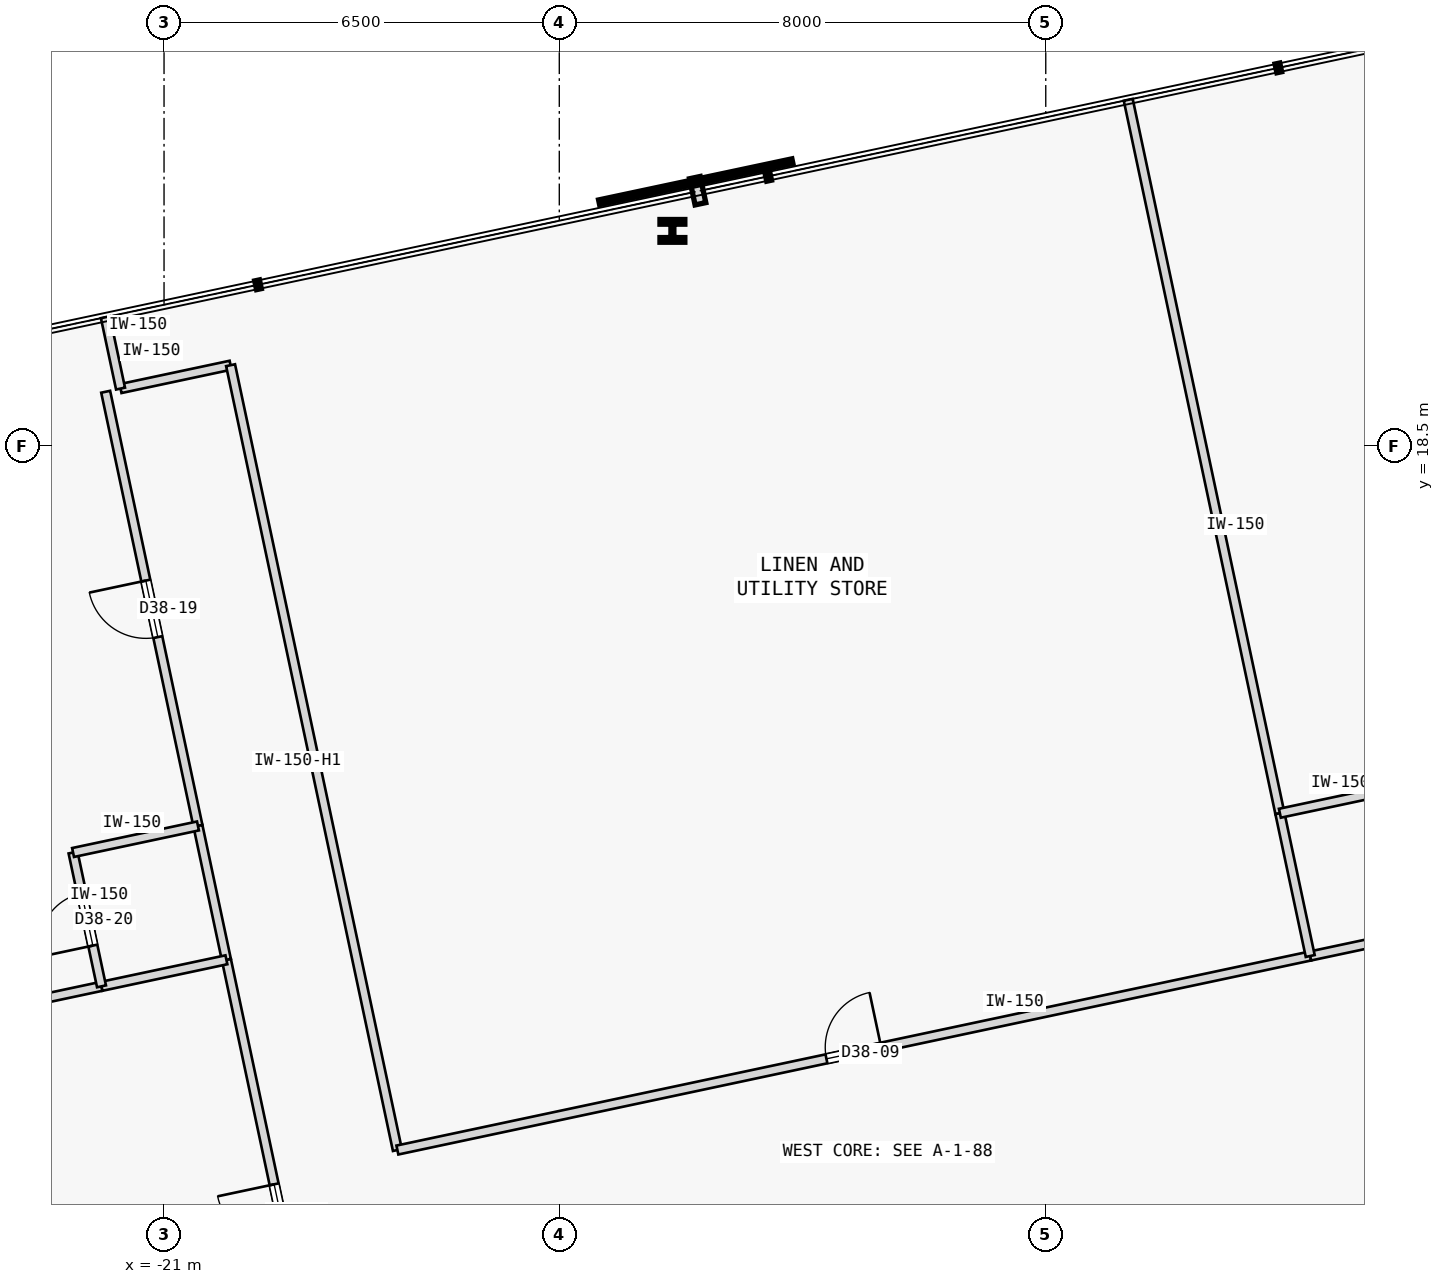
"""IFC4 building model, lengths in metres.
Left out: names, types, materials, properties, quantities, classifications, styles, units other than length and angle.
Written with IfcOpenShell. Run it as: python <this file> out.ifc"""

import sys

from ifc_helpers import new_model, si_unit, direction, frame, frame_2d, origin, origin_2d, place, context, subcontext, project, spatial, rectangle, i_section, extrude, element, fill, save


model = new_model("IFC4")
c1 = context("Model", 3, precision=1e-05, world=origin(), true_north=direction((0.0, 1.0)))
c2 = subcontext(c1, "Body", "Model", "MODEL_VIEW")
j1 = project(units=[si_unit("LENGTHUNIT", "METRE"), si_unit("PLANEANGLEUNIT", "RADIAN")], contexts=[c1])
p1 = place(None, origin())
s1 = spatial("IfcSite", under=j1, at=p1, CompositionType="ELEMENT")
p2 = place(p1, origin())
s2 = spatial("IfcBuilding", under=s1, at=p2, CompositionType="ELEMENT")
p3 = place(p2, frame((0.0, 0.0, 151.4)))
s3 = spatial("IfcBuildingStorey", under=s2, at=p3, CompositionType="ELEMENT", Elevation=151.4)
p4 = place(p3, frame((-12.64, 22.042, 0.0), z_axis=(0.0, 0.0, 1.0), x_axis=(1.0, 0.0, 0.0)))
e1 = element("IfcColumn", 1, at=p4, inside=s3, PredefinedType="COLUMN", context=c2, shape_type="SweptSolid", body=[
    extrude(i_section(OverallWidth=0.409, OverallDepth=0.374, WebThickness=0.048, FlangeThickness=0.077, FilletRadius=0.015, at=origin_2d()), origin(), (0.0, 0.0, 1.0), 3.4),
])
p5 = place(p3, frame((-21.715, 19.448, 0.0), z_axis=(0.0, 0.0, 1.0), x_axis=(0.978160192495, 0.207852442415, 0.0)))
e2 = element("IfcWall", 2, at=p5, inside=s3, PredefinedType="PARTITIONING", context=c2, shape_type="SweptSolid", body=[
    extrude(rectangle(XDim=1.85, YDim=0.15, at=frame_2d((0.925, 0.0))), origin(), (0.0, 0.0, 1.0), 3.175),
])
p6 = place(p3, frame((-17.162, 6.926, 0.0), z_axis=(0.0, 0.0, 1.0), x_axis=(-0.207911421929, 0.978147657888, 0.0)))
e3 = element("IfcWall", 3, at=p6, inside=s3, PredefinedType="PARTITIONING", context=c2, shape_type="SweptSolid", body=[
    extrude(rectangle(XDim=13.195, YDim=0.15, at=frame_2d((6.598, 0.0))), origin(), (0.0, 0.0, 1.0), 2.725),
])
p7 = place(p3, frame((-17.162, 6.926, 0.0), z_axis=(0.0, 0.0, 1.0), x_axis=(0.978145870853, 0.207919829103, 0.0)))
e4 = element("IfcWall", 4, at=p7, inside=s3, PredefinedType="PARTITIONING", context=c2, shape_type="SweptSolid", body=[
    extrude(rectangle(XDim=15.347, YDim=0.15, at=frame_2d((7.673, 0.0))), origin(), (0.0, 0.0, 1.0), 3.175),
])
p8 = place(p7, frame((7.213, 0.0, 0.0)))
e5 = element("IfcOpeningElement", 5, at=p8, cuts=e4, PredefinedType="OPENING", context=c2, shape_type="SweptSolid", body=[
    extrude(rectangle(XDim=0.92, YDim=2.15, at=frame_2d((0.46, 1.075))), frame((0.0, 0.085, 0.0), z_axis=(0.0, -1.0, 0.0), x_axis=(1.0, 0.0, 0.0)), (0.0, 0.0, 1.0), 0.17),
])
p9 = place(p3, frame((-2.151, 10.117, 0.0), z_axis=(0.0, 0.0, 1.0), x_axis=(0.978146728319, 0.207915795165, 0.0)))
e6 = element("IfcWall", 6, at=p9, inside=s3, PredefinedType="PARTITIONING", context=c2, shape_type="SweptSolid", body=[
    extrude(rectangle(XDim=2.15, YDim=0.15, at=frame_2d((1.075, 0.0))), origin(), (0.0, 0.0, 1.0), 3.175),
])
p10 = place(p3, frame((-18.207, 1.74, 0.0), z_axis=(0.0, 0.0, 1.0), x_axis=(-0.207922306475, 0.978145344246, 0.0)))
e7 = element("IfcWall", 7, at=p10, inside=s3, PredefinedType="PARTITIONING", context=c2, shape_type="SweptSolid", body=[
    extrude(rectangle(XDim=8.5, YDim=0.15, at=frame_2d((4.25, 0.0))), origin(), (0.0, 0.0, 1.0), 3.175),
])
p11 = place(p10, frame((3.775, 0.0, 0.0)))
e8 = element("IfcOpeningElement", 8, at=p11, cuts=e7, PredefinedType="OPENING", context=c2, shape_type="SweptSolid", body=[
    extrude(rectangle(XDim=0.95, YDim=2.15, at=frame_2d((0.475, 1.075))), frame((0.0, 0.085, 0.0), z_axis=(0.0, -1.0, 0.0), x_axis=(1.0, 0.0, 0.0)), (0.0, 0.0, 1.0), 0.17),
])
p12 = place(p3, frame((-20.442, 12.255, 0.0), z_axis=(0.0, 0.0, 1.0), x_axis=(-0.207916352354, 0.978146609882, 0.0)))
e9 = element("IfcWall", 9, at=p12, inside=s3, PredefinedType="PARTITIONING", context=c2, shape_type="SweptSolid", body=[
    extrude(rectangle(XDim=7.3, YDim=0.15, at=frame_2d((3.65, 0.0))), origin(), (0.0, 0.0, 1.0), 3.175),
])
p13 = place(p12, frame((3.175, 0.0, 0.0)))
e10 = element("IfcOpeningElement", 10, at=p13, cuts=e9, PredefinedType="OPENING", context=c2, shape_type="SweptSolid", body=[
    extrude(rectangle(XDim=0.95, YDim=2.15, at=frame_2d((0.475, 1.075))), frame((0.0, 0.085, 0.0), z_axis=(0.0, -1.0, 0.0), x_axis=(1.0, 0.0, 0.0)), (0.0, 0.0, 1.0), 0.17),
])
p14 = place(p3, frame((-19.974, 10.055, 0.0), z_axis=(0.0, 0.0, 1.0), x_axis=(-0.207913264065, 0.978147266328, 0.0)))
e11 = element("IfcWall", 11, at=p14, inside=s3, PredefinedType="PARTITIONING", context=c2, shape_type="SweptSolid", body=[
    extrude(rectangle(XDim=2.25, YDim=0.15, at=frame_2d((1.125, 0.0))), origin(), (0.0, 0.0, 1.0), 3.175),
])
p15 = place(p3, frame((-2.65, 12.464, 0.0), z_axis=(0.0, 0.0, 1.0), x_axis=(-0.207914988081, 0.978146899873, 0.0)))
e12 = element("IfcWall", 12, at=p15, inside=s3, PredefinedType="PARTITIONING", context=c2, shape_type="SweptSolid", body=[
    extrude(rectangle(XDim=11.995, YDim=0.15, at=frame_2d((5.998, 0.0))), origin(), (0.0, 0.0, 1.0), 3.175),
])
p16 = place(p3, frame((-2.151, 10.117, 0.0), z_axis=(0.0, 0.0, 1.0), x_axis=(-0.207917150959, 0.978146440129, 0.0)))
e13 = element("IfcWall", 13, at=p16, inside=s3, PredefinedType="PARTITIONING", context=c2, shape_type="SweptSolid", body=[
    extrude(rectangle(XDim=2.4, YDim=0.15, at=frame_2d((1.2, 0.0))), origin(), (0.0, 0.0, 1.0), 3.175),
])
p17 = place(p3, frame((-21.715, 19.448, 0.0), z_axis=(0.0, 0.0, 1.0), x_axis=(-0.20795853359, 0.978137642823, 0.0)))
e14 = element("IfcWall", 14, at=p17, inside=s3, PredefinedType="PARTITIONING", context=c2, shape_type="SweptSolid", body=[
    extrude(rectangle(XDim=1.2, YDim=0.15, at=frame_2d((0.6, 0.0))), origin(), (0.0, 0.0, 1.0), 3.175),
])
p18 = place(p3, frame((-2.65, 12.464, 0.0), z_axis=(0.0, 0.0, 1.0), x_axis=(0.978146728319, 0.207915795165, 0.0)))
e15 = element("IfcWall", 15, at=p18, inside=s3, PredefinedType="PARTITIONING", context=c2, shape_type="SweptSolid", body=[
    extrude(rectangle(XDim=2.15, YDim=0.15, at=frame_2d((1.075, 0.0))), origin(), (0.0, 0.0, 1.0), 3.175),
])
p19 = place(p3, frame((-37.403, 6.35, 0.0), z_axis=(0.0, 0.0, 1.0), x_axis=(0.978149296727, 0.207903711638, 0.0)))
e16 = element("IfcWall", 16, at=p19, inside=s3, PredefinedType="PARTITIONING", context=c2, shape_type="SweptSolid", body=[
    extrude(rectangle(XDim=15.718, YDim=0.15, at=frame_2d((7.859, 0.0))), origin(), (0.0, 0.0, 1.0), 3.175),
])
p20 = place(p3, frame((-22.029, 9.618, 0.0), z_axis=(0.0, 0.0, 1.0), x_axis=(0.978134617382, 0.207972763311, 0.0)))
e17 = element("IfcWall", 17, at=p20, inside=s3, PredefinedType="PARTITIONING", context=c2, shape_type="SweptSolid", body=[
    extrude(rectangle(XDim=2.1, YDim=0.15, at=frame_2d((1.05, 0.0))), origin(), (0.0, 0.0, 1.0), 3.175),
])
p21 = place(p3, frame((-22.029, 9.618, 0.0), z_axis=(0.0, 0.0, 1.0), x_axis=(-0.207891197838, 0.978151956427, 0.0)))
e18 = element("IfcWall", 18, at=p21, inside=s3, PredefinedType="PARTITIONING", context=c2, shape_type="SweptSolid", body=[
    extrude(rectangle(XDim=2.25, YDim=0.15, at=frame_2d((1.125, 0.0))), origin(), (0.0, 0.0, 1.0), 3.175),
])
p22 = place(p21, frame((0.685, 0.0, 0.0)))
e19 = element("IfcOpeningElement", 19, at=p22, cuts=e18, PredefinedType="OPENING", context=c2, shape_type="SweptSolid", body=[
    extrude(rectangle(XDim=0.88, YDim=2.15, at=frame_2d((0.44, 1.075))), frame((0.0, 0.085, 0.0), z_axis=(0.0, -1.0, 0.0), x_axis=(1.0, 0.0, 0.0)), (0.0, 0.0, 1.0), 0.17),
])
p23 = place(p3, frame((-22.496, 11.819, 0.0), z_axis=(0.0, 0.0, 1.0), x_axis=(0.97815826, 0.207861536591, 0.0)))
e20 = element("IfcWall", 20, at=p23, inside=s3, PredefinedType="PARTITIONING", context=c2, shape_type="SweptSolid", body=[
    extrude(rectangle(XDim=2.1, YDim=0.15, at=frame_2d((1.05, 0.0))), origin(), (0.0, 0.0, 1.0), 3.175),
])
p24 = place(p8, origin())
e21 = element("IfcDoor", 21, at=p24, inside=s3, OperationType="SINGLE_SWING_RIGHT", PredefinedType="DOOR", context=c2, shape_type="SweptSolid", body=[
    extrude(rectangle(XDim=0.92, YDim=2.15, at=frame_2d((0.46, 1.075))), frame((0.0, 0.025, 0.0), z_axis=(0.0, -1.0, 0.0), x_axis=(1.0, 0.0, 0.0)), (0.0, 0.0, 1.0), 0.05),
])
fill(e5, e21)
p25 = place(p11, origin())
e22 = element("IfcDoor", 22, at=p25, inside=s3, OperationType="SINGLE_SWING_RIGHT", PredefinedType="DOOR", context=c2, shape_type="SweptSolid", body=[
    extrude(rectangle(XDim=0.95, YDim=2.15, at=frame_2d((0.475, 1.075))), frame((0.0, 0.025, 0.0), z_axis=(0.0, -1.0, 0.0), x_axis=(1.0, 0.0, 0.0)), (0.0, 0.0, 1.0), 0.05),
])
fill(e8, e22)
p26 = place(p13, origin())
e23 = element("IfcDoor", 23, at=p26, inside=s3, OperationType="SINGLE_SWING_RIGHT", PredefinedType="DOOR", context=c2, shape_type="SweptSolid", body=[
    extrude(rectangle(XDim=0.95, YDim=2.15, at=frame_2d((0.475, 1.075))), frame((0.0, 0.025, 0.0), z_axis=(0.0, -1.0, 0.0), x_axis=(1.0, 0.0, 0.0)), (0.0, 0.0, 1.0), 0.05),
])
fill(e10, e23)
p27 = place(p22, origin())
e24 = element("IfcDoor", 24, at=p27, inside=s3, OperationType="SINGLE_SWING_LEFT", PredefinedType="DOOR", context=c2, shape_type="SweptSolid", body=[
    extrude(rectangle(XDim=0.88, YDim=2.15, at=frame_2d((0.44, 1.075))), frame((0.0, 0.025, 0.0), z_axis=(0.0, -1.0, 0.0), x_axis=(1.0, 0.0, 0.0)), (0.0, 0.0, 1.0), 0.05),
])
fill(e19, e24)
save(model, sys.argv[1])
